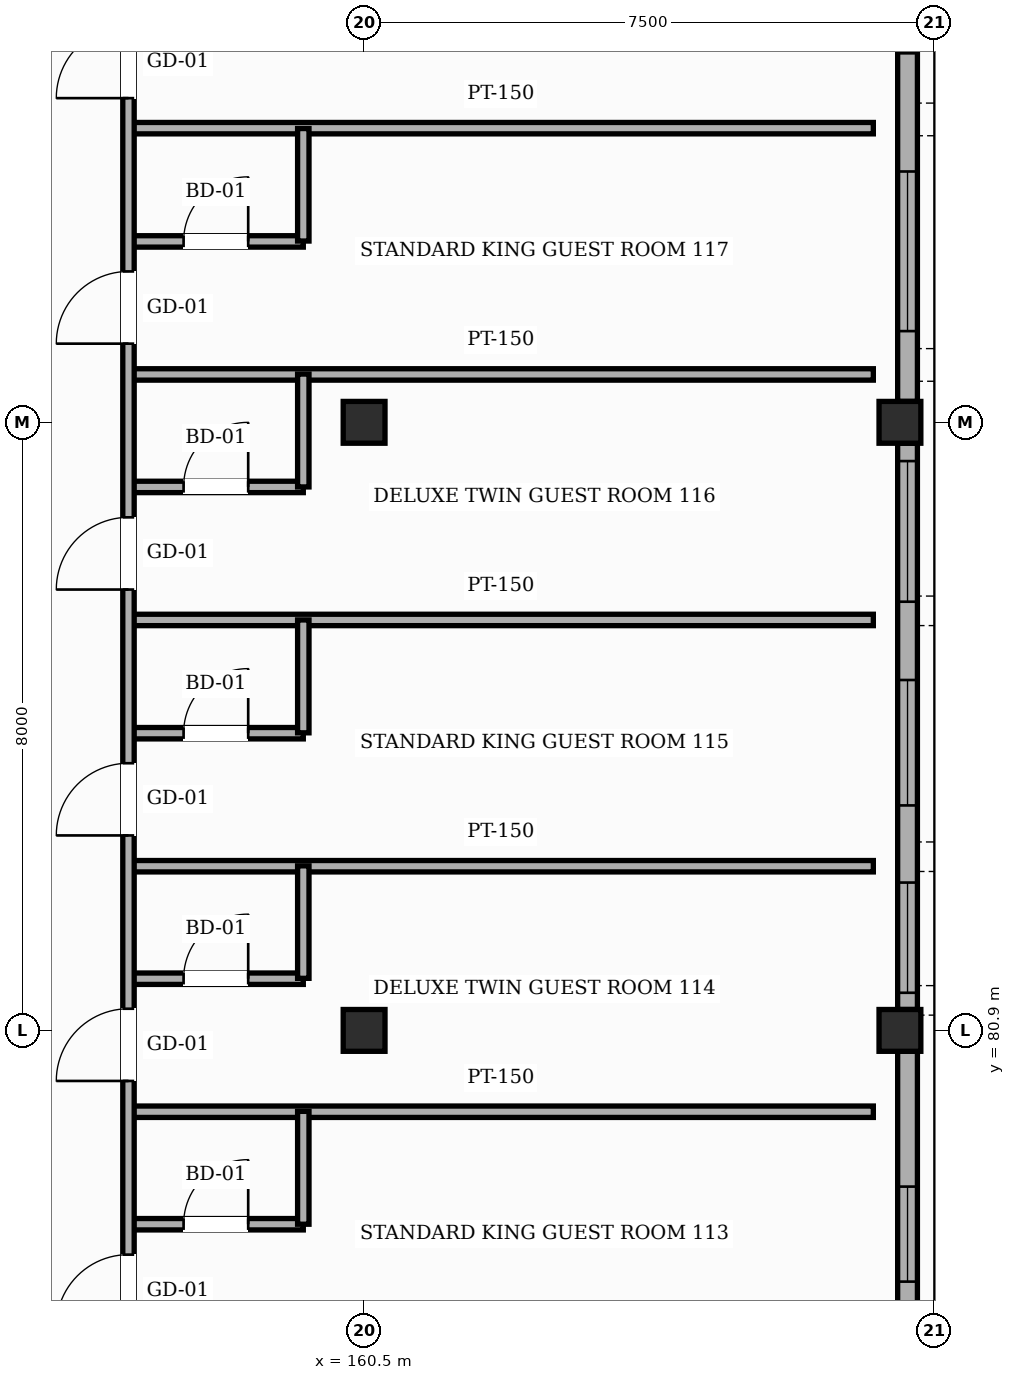
"""IFC4 building model, lengths in metres.
Left out: names, types, materials, properties, quantities, classifications, styles, units other than length and angle.
Written with IfcOpenShell. Run it as: python <this file> out.ifc"""

import sys

from ifc_helpers import new_model, si_unit, direction, frame, frame_2d, origin, origin_2d, place, context, subcontext, project, spatial, rectangle, hollow_rectangle, extrude, element, fill, save


model = new_model("IFC4")
c1 = context("Model", 3, precision=1e-05, world=origin(), true_north=direction((0.0, 1.0)))
c2 = subcontext(c1, "Body", "Model", "MODEL_VIEW")
j1 = project(units=[si_unit("LENGTHUNIT", "METRE"), si_unit("PLANEANGLEUNIT", "RADIAN")], contexts=[c1])
p1 = place(None, origin())
s1 = spatial("IfcSite", under=j1, at=p1, CompositionType="ELEMENT")
p2 = place(p1, origin())
s2 = spatial("IfcBuilding", under=s1, at=p2, CompositionType="ELEMENT")
p3 = place(p2, frame((0.0, 0.0, 24.6)))
s3 = spatial("IfcBuildingStorey", under=s2, at=p3, CompositionType="ELEMENT", Elevation=24.6)
for number, where, z_axis, x_axis in (
    (1, (160.5, 80.9, 0.0), (0.0, 0.0, 1.0), (1.0, 0.0, 0.0)),
    (2, (160.5, 88.9, 0.0), (0.0, 0.0, 1.0), (1.0, 0.0, 0.0)),
    (3, (167.55, 80.9, 0.0), (0.0, 0.0, 1.0), (1.0, 0.0, 0.0)),
    (4, (167.55, 88.9, 0.0), (0.0, 0.0, 1.0), (1.0, 0.0, 0.0)),
):
    element("IfcColumn", number, at=place(p3, frame(where, z_axis=z_axis, x_axis=x_axis)), inside=s3, PredefinedType="COLUMN", context=c2, shape_type="SweptSolid", body=[
        extrude(hollow_rectangle(XDim=0.55, YDim=0.55, WallThickness=0.022, InnerFilletRadius=0.022, OuterFilletRadius=0.044, at=origin_2d()), origin(), (0.0, 0.0, 1.0), 3.6),
    ])
p4 = place(p3, frame((167.65, 80.625, 0.0), z_axis=(0.0, 0.0, 1.0), x_axis=(0.0, -1.0, 0.0)))
e5 = element("IfcWall", 5, at=p4, inside=s3, PredefinedType="SOLIDWALL", context=c2, shape_type="SweptSolid", body=[
    extrude(rectangle(XDim=4.2, YDim=0.26, at=frame_2d((2.1, 0.0))), origin(), (0.0, 0.0, 1.0), 3.365),
])
p5 = place(p4, frame((1.78, 0.0, 0.85)))
e6 = element("IfcOpeningElement", 6, at=p5, cuts=e5, PredefinedType="OPENING", context=c2, shape_type="SweptSolid", body=[
    extrude(rectangle(XDim=1.25, YDim=1.65, at=frame_2d((0.625, 0.825))), frame((0.0, 0.14, 0.0), z_axis=(0.0, -1.0, 0.0), x_axis=(1.0, 0.0, 0.0)), (0.0, 0.0, 1.0), 0.28),
])
p6 = place(p3, frame((167.65, 88.625, 0.0), z_axis=(0.0, 0.0, 1.0), x_axis=(0.0, -1.0, 0.0)))
e7 = element("IfcWall", 7, at=p6, inside=s3, PredefinedType="SOLIDWALL", context=c2, shape_type="SweptSolid", body=[
    extrude(rectangle(XDim=7.45, YDim=0.26, at=frame_2d((3.725, 0.0))), origin(), (0.0, 0.0, 1.0), 2.755),
])
p7 = place(p6, frame((5.78, 0.0, 0.85)))
e8 = element("IfcOpeningElement", 8, at=p7, cuts=e7, PredefinedType="OPENING", context=c2, shape_type="SweptSolid", body=[
    extrude(rectangle(XDim=1.45, YDim=1.65, at=frame_2d((0.725, 0.825))), frame((0.0, 0.14, 0.0), z_axis=(0.0, -1.0, 0.0), x_axis=(1.0, 0.0, 0.0)), (0.0, 0.0, 1.0), 0.28),
])
p8 = place(p6, frame((3.115, 0.0, 0.85)))
e9 = element("IfcOpeningElement", 9, at=p8, cuts=e7, PredefinedType="OPENING", context=c2, shape_type="SweptSolid", body=[
    extrude(rectangle(XDim=1.65, YDim=1.65, at=frame_2d((0.825, 0.825))), frame((0.0, 0.14, 0.0), z_axis=(0.0, -1.0, 0.0), x_axis=(1.0, 0.0, 0.0)), (0.0, 0.0, 1.0), 0.28),
])
p9 = place(p6, frame((0.235, 0.0, 0.85)))
e10 = element("IfcOpeningElement", 10, at=p9, cuts=e7, PredefinedType="OPENING", context=c2, shape_type="SweptSolid", body=[
    extrude(rectangle(XDim=1.85, YDim=1.65, at=frame_2d((0.925, 0.825))), frame((0.0, 0.14, 0.0), z_axis=(0.0, -1.0, 0.0), x_axis=(1.0, 0.0, 0.0)), (0.0, 0.0, 1.0), 0.28),
])
p10 = place(p3, frame((167.65, 96.0, 0.0), z_axis=(0.0, 0.0, 1.0), x_axis=(0.0, -1.0, 0.0)))
e11 = element("IfcWall", 11, at=p10, inside=s3, PredefinedType="SOLIDWALL", context=c2, shape_type="SweptSolid", body=[
    extrude(rectangle(XDim=6.825, YDim=0.26, at=frame_2d((3.413, 0.0))), origin(), (0.0, 0.0, 1.0), 2.755),
])
p11 = place(p10, frame((3.8, 0.0, 0.85)))
e12 = element("IfcOpeningElement", 12, at=p11, cuts=e11, PredefinedType="OPENING", context=c2, shape_type="SweptSolid", body=[
    extrude(rectangle(XDim=2.1, YDim=1.65, at=frame_2d((1.05, 0.825))), frame((0.0, 0.14, 0.0), z_axis=(0.0, -1.0, 0.0), x_axis=(1.0, 0.0, 0.0)), (0.0, 0.0, 1.0), 0.28),
])
p12 = place(p10, frame((0.995, 0.0, 0.85)))
e13 = element("IfcOpeningElement", 13, at=p12, cuts=e11, PredefinedType="OPENING", context=c2, shape_type="SweptSolid", body=[
    extrude(rectangle(XDim=1.25, YDim=1.35, at=frame_2d((0.625, 0.675))), frame((0.0, 0.14, 0.0), z_axis=(0.0, -1.0, 0.0), x_axis=(1.0, 0.0, 0.0)), (0.0, 0.0, 1.0), 0.28),
])
p13 = place(p3, frame((157.4, 78.35, 0.0), z_axis=(0.0, 0.0, 1.0), x_axis=(1.0, 0.0, 0.0)))
e14 = element("IfcWall", 14, at=p13, inside=s3, PredefinedType="PARTITIONING", context=c2, shape_type="SweptSolid", body=[
    extrude(rectangle(XDim=2.3, YDim=0.15, at=frame_2d((1.15, 0.0))), origin(), (0.0, 0.0, 1.0), 3.365),
])
p14 = place(p13, frame((0.725, 0.0, 0.0)))
e15 = element("IfcOpeningElement", 15, at=p14, cuts=e14, PredefinedType="OPENING", context=c2, shape_type="SweptSolid", body=[
    extrude(rectangle(XDim=0.85, YDim=2.1, at=frame_2d((0.425, 1.05))), frame((0.0, 0.085, 0.0), z_axis=(0.0, -1.0, 0.0), x_axis=(1.0, 0.0, 0.0)), (0.0, 0.0, 1.0), 0.17),
])
p15 = place(p3, frame((157.4, 79.83, 0.0), z_axis=(0.0, 0.0, 1.0), x_axis=(1.0, 0.0, 0.0)))
e16 = element("IfcWall", 16, at=p15, inside=s3, PredefinedType="PARTITIONING", context=c2, shape_type="SweptSolid", body=[
    extrude(rectangle(XDim=9.8, YDim=0.15, at=frame_2d((4.9, 0.0))), origin(), (0.0, 0.0, 1.0), 3.365),
])
p16 = place(p3, frame((157.4, 81.58, 0.0), z_axis=(0.0, 0.0, 1.0), x_axis=(1.0, 0.0, 0.0)))
e17 = element("IfcWall", 17, at=p16, inside=s3, PredefinedType="PARTITIONING", context=c2, shape_type="SweptSolid", body=[
    extrude(rectangle(XDim=2.3, YDim=0.15, at=frame_2d((1.15, 0.0))), origin(), (0.0, 0.0, 1.0), 3.365),
])
p17 = place(p16, frame((0.725, 0.0, 0.0)))
e18 = element("IfcOpeningElement", 18, at=p17, cuts=e17, PredefinedType="OPENING", context=c2, shape_type="SweptSolid", body=[
    extrude(rectangle(XDim=0.85, YDim=2.1, at=frame_2d((0.425, 1.05))), frame((0.0, 0.085, 0.0), z_axis=(0.0, -1.0, 0.0), x_axis=(1.0, 0.0, 0.0)), (0.0, 0.0, 1.0), 0.17),
])
p18 = place(p3, frame((157.4, 83.06, 0.0), z_axis=(0.0, 0.0, 1.0), x_axis=(1.0, 0.0, 0.0)))
e19 = element("IfcWall", 19, at=p18, inside=s3, PredefinedType="PARTITIONING", context=c2, shape_type="SweptSolid", body=[
    extrude(rectangle(XDim=9.8, YDim=0.15, at=frame_2d((4.9, 0.0))), origin(), (0.0, 0.0, 1.0), 3.365),
])
p19 = place(p3, frame((157.4, 84.81, 0.0), z_axis=(0.0, 0.0, 1.0), x_axis=(1.0, 0.0, 0.0)))
e20 = element("IfcWall", 20, at=p19, inside=s3, PredefinedType="PARTITIONING", context=c2, shape_type="SweptSolid", body=[
    extrude(rectangle(XDim=2.3, YDim=0.15, at=frame_2d((1.15, 0.0))), origin(), (0.0, 0.0, 1.0), 3.005),
])
p20 = place(p19, frame((0.725, 0.0, 0.0)))
e21 = element("IfcOpeningElement", 21, at=p20, cuts=e20, PredefinedType="OPENING", context=c2, shape_type="SweptSolid", body=[
    extrude(rectangle(XDim=0.85, YDim=2.1, at=frame_2d((0.425, 1.05))), frame((0.0, 0.085, 0.0), z_axis=(0.0, -1.0, 0.0), x_axis=(1.0, 0.0, 0.0)), (0.0, 0.0, 1.0), 0.17),
])
p21 = place(p3, frame((157.4, 86.3, 0.0), z_axis=(0.0, 0.0, 1.0), x_axis=(1.0, 0.0, 0.0)))
e22 = element("IfcWall", 22, at=p21, inside=s3, PredefinedType="PARTITIONING", context=c2, shape_type="SweptSolid", body=[
    extrude(rectangle(XDim=9.8, YDim=0.15, at=frame_2d((4.9, 0.0))), origin(), (0.0, 0.0, 1.0), 3.365),
])
p22 = place(p3, frame((157.4, 88.05, 0.0), z_axis=(0.0, 0.0, 1.0), x_axis=(1.0, 0.0, 0.0)))
e23 = element("IfcWall", 23, at=p22, inside=s3, PredefinedType="PARTITIONING", context=c2, shape_type="SweptSolid", body=[
    extrude(rectangle(XDim=2.3, YDim=0.15, at=frame_2d((1.15, 0.0))), origin(), (0.0, 0.0, 1.0), 3.365),
])
p23 = place(p22, frame((0.725, 0.0, 0.0)))
e24 = element("IfcOpeningElement", 24, at=p23, cuts=e23, PredefinedType="OPENING", context=c2, shape_type="SweptSolid", body=[
    extrude(rectangle(XDim=0.85, YDim=2.1, at=frame_2d((0.425, 1.05))), frame((0.0, 0.085, 0.0), z_axis=(0.0, -1.0, 0.0), x_axis=(1.0, 0.0, 0.0)), (0.0, 0.0, 1.0), 0.17),
])
p24 = place(p3, frame((157.4, 89.53, 0.0), z_axis=(0.0, 0.0, 1.0), x_axis=(1.0, 0.0, 0.0)))
e25 = element("IfcWall", 25, at=p24, inside=s3, PredefinedType="PARTITIONING", context=c2, shape_type="SweptSolid", body=[
    extrude(rectangle(XDim=9.8, YDim=0.15, at=frame_2d((4.9, 0.0))), origin(), (0.0, 0.0, 1.0), 3.365),
])
p25 = place(p3, frame((157.4, 91.28, 0.0), z_axis=(0.0, 0.0, 1.0), x_axis=(1.0, 0.0, 0.0)))
e26 = element("IfcWall", 26, at=p25, inside=s3, PredefinedType="PARTITIONING", context=c2, shape_type="SweptSolid", body=[
    extrude(rectangle(XDim=2.3, YDim=0.15, at=frame_2d((1.15, 0.0))), origin(), (0.0, 0.0, 1.0), 3.365),
])
p26 = place(p25, frame((0.725, 0.0, 0.0)))
e27 = element("IfcOpeningElement", 27, at=p26, cuts=e26, PredefinedType="OPENING", context=c2, shape_type="SweptSolid", body=[
    extrude(rectangle(XDim=0.85, YDim=2.1, at=frame_2d((0.425, 1.05))), frame((0.0, 0.085, 0.0), z_axis=(0.0, -1.0, 0.0), x_axis=(1.0, 0.0, 0.0)), (0.0, 0.0, 1.0), 0.17),
])
p27 = place(p3, frame((157.4, 92.77, 0.0), z_axis=(0.0, 0.0, 1.0), x_axis=(1.0, 0.0, 0.0)))
e28 = element("IfcWall", 28, at=p27, inside=s3, PredefinedType="PARTITIONING", context=c2, shape_type="SweptSolid", body=[
    extrude(rectangle(XDim=9.8, YDim=0.15, at=frame_2d((4.9, 0.0))), origin(), (0.0, 0.0, 1.0), 3.005),
])
p28 = place(p3, frame((157.4, 76.6, 0.0), z_axis=(0.0, 0.0, 1.0), x_axis=(0.0, 1.0, 0.0)))
e29 = element("IfcWall", 29, at=p28, inside=s3, PredefinedType="PARTITIONING", context=c2, shape_type="SweptSolid", body=[
    extrude(rectangle(XDim=28.0, YDim=0.15, at=frame_2d((14.0, 0.0))), origin(), (0.0, 0.0, 1.0), 3.365),
])
p29 = place(p28, frame((22.95, 0.0, 0.0)))
e30 = element("IfcOpeningElement", 30, at=p29, cuts=e29, PredefinedType="OPENING", context=c2, shape_type="SweptSolid", body=[
    extrude(rectangle(XDim=1.5, YDim=2.3, at=frame_2d((0.75, 1.15))), frame((0.0, 0.085, 0.0), z_axis=(0.0, -1.0, 0.0), x_axis=(1.0, 0.0, 0.0)), (0.0, 0.0, 1.0), 0.17),
])
p30 = place(p28, frame((0.4, 0.0, 0.0)))
e31 = element("IfcOpeningElement", 31, at=p30, cuts=e29, PredefinedType="OPENING", context=c2, shape_type="SweptSolid", body=[
    extrude(rectangle(XDim=0.95, YDim=2.15, at=frame_2d((0.475, 1.075))), frame((0.0, 0.085, 0.0), z_axis=(0.0, -1.0, 0.0), x_axis=(1.0, 0.0, 0.0)), (0.0, 0.0, 1.0), 0.17),
])
p31 = place(p28, frame((3.635, 0.0, 0.0)))
e32 = element("IfcOpeningElement", 32, at=p31, cuts=e29, PredefinedType="OPENING", context=c2, shape_type="SweptSolid", body=[
    extrude(rectangle(XDim=0.95, YDim=2.15, at=frame_2d((0.475, 1.075))), frame((0.0, 0.085, 0.0), z_axis=(0.0, -1.0, 0.0), x_axis=(1.0, 0.0, 0.0)), (0.0, 0.0, 1.0), 0.17),
])
p32 = place(p28, frame((6.865, 0.0, 0.0)))
e33 = element("IfcOpeningElement", 33, at=p32, cuts=e29, PredefinedType="OPENING", context=c2, shape_type="SweptSolid", body=[
    extrude(rectangle(XDim=0.95, YDim=2.15, at=frame_2d((0.475, 1.075))), frame((0.0, 0.085, 0.0), z_axis=(0.0, -1.0, 0.0), x_axis=(1.0, 0.0, 0.0)), (0.0, 0.0, 1.0), 0.17),
])
p33 = place(p28, frame((10.1, 0.0, 0.0)))
e34 = element("IfcOpeningElement", 34, at=p33, cuts=e29, PredefinedType="OPENING", context=c2, shape_type="SweptSolid", body=[
    extrude(rectangle(XDim=0.95, YDim=2.15, at=frame_2d((0.475, 1.075))), frame((0.0, 0.085, 0.0), z_axis=(0.0, -1.0, 0.0), x_axis=(1.0, 0.0, 0.0)), (0.0, 0.0, 1.0), 0.17),
])
p34 = place(p28, frame((13.335, 0.0, 0.0)))
e35 = element("IfcOpeningElement", 35, at=p34, cuts=e29, PredefinedType="OPENING", context=c2, shape_type="SweptSolid", body=[
    extrude(rectangle(XDim=0.95, YDim=2.15, at=frame_2d((0.475, 1.075))), frame((0.0, 0.085, 0.0), z_axis=(0.0, -1.0, 0.0), x_axis=(1.0, 0.0, 0.0)), (0.0, 0.0, 1.0), 0.17),
])
p35 = place(p28, frame((16.565, 0.0, 0.0)))
e36 = element("IfcOpeningElement", 36, at=p35, cuts=e29, PredefinedType="OPENING", context=c2, shape_type="SweptSolid", body=[
    extrude(rectangle(XDim=0.95, YDim=2.15, at=frame_2d((0.475, 1.075))), frame((0.0, 0.085, 0.0), z_axis=(0.0, -1.0, 0.0), x_axis=(1.0, 0.0, 0.0)), (0.0, 0.0, 1.0), 0.17),
])
p36 = place(p3, frame((159.7, 78.35, 0.0), z_axis=(0.0, 0.0, 1.0), x_axis=(0.0, 1.0, 0.0)))
e37 = element("IfcWall", 37, at=p36, inside=s3, PredefinedType="PARTITIONING", context=c2, shape_type="SweptSolid", body=[
    extrude(rectangle(XDim=1.485, YDim=0.15, at=frame_2d((0.742, 0.0))), origin(), (0.0, 0.0, 1.0), 3.365),
])
p37 = place(p3, frame((159.7, 81.585, 0.0), z_axis=(0.0, 0.0, 1.0), x_axis=(0.0, 1.0, 0.0)))
e38 = element("IfcWall", 38, at=p37, inside=s3, PredefinedType="PARTITIONING", context=c2, shape_type="SweptSolid", body=[
    extrude(rectangle(XDim=1.48, YDim=0.15, at=frame_2d((0.74, 0.0))), origin(), (0.0, 0.0, 1.0), 3.365),
])
p38 = place(p3, frame((159.7, 84.815, 0.0), z_axis=(0.0, 0.0, 1.0), x_axis=(0.0, 1.0, 0.0)))
e39 = element("IfcWall", 39, at=p38, inside=s3, PredefinedType="PARTITIONING", context=c2, shape_type="SweptSolid", body=[
    extrude(rectangle(XDim=1.485, YDim=0.15, at=frame_2d((0.743, 0.0))), origin(), (0.0, 0.0, 1.0), 3.365),
])
p39 = place(p3, frame((159.7, 88.05, 0.0), z_axis=(0.0, 0.0, 1.0), x_axis=(0.0, 1.0, 0.0)))
e40 = element("IfcWall", 40, at=p39, inside=s3, PredefinedType="PARTITIONING", context=c2, shape_type="SweptSolid", body=[
    extrude(rectangle(XDim=1.485, YDim=0.15, at=frame_2d((0.742, 0.0))), origin(), (0.0, 0.0, 1.0), 3.365),
])
p40 = place(p3, frame((159.7, 91.285, 0.0), z_axis=(0.0, 0.0, 1.0), x_axis=(0.0, 1.0, 0.0)))
e41 = element("IfcWall", 41, at=p40, inside=s3, PredefinedType="PARTITIONING", context=c2, shape_type="SweptSolid", body=[
    extrude(rectangle(XDim=1.48, YDim=0.15, at=frame_2d((0.74, 0.0))), origin(), (0.0, 0.0, 1.0), 3.365),
])
p41 = place(p5, origin())
e42 = element("IfcWindow", 42, at=p41, inside=s3, PartitioningType="SINGLE_PANEL", PredefinedType="WINDOW", context=c2, shape_type="SweptSolid", body=[
    extrude(rectangle(XDim=1.25, YDim=1.65, at=frame_2d((0.625, 0.825))), frame((0.0, 0.03, 0.0), z_axis=(0.0, -1.0, 0.0), x_axis=(1.0, 0.0, 0.0)), (0.0, 0.0, 1.0), 0.06),
])
fill(e6, e42)
p42 = place(p7, origin())
e43 = element("IfcWindow", 43, at=p42, inside=s3, PartitioningType="SINGLE_PANEL", PredefinedType="WINDOW", context=c2, shape_type="SweptSolid", body=[
    extrude(rectangle(XDim=1.45, YDim=1.65, at=frame_2d((0.725, 0.825))), frame((0.0, 0.03, 0.0), z_axis=(0.0, -1.0, 0.0), x_axis=(1.0, 0.0, 0.0)), (0.0, 0.0, 1.0), 0.06),
])
fill(e8, e43)
p43 = place(p8, origin())
e44 = element("IfcWindow", 44, at=p43, inside=s3, PartitioningType="SINGLE_PANEL", PredefinedType="WINDOW", context=c2, shape_type="SweptSolid", body=[
    extrude(rectangle(XDim=1.65, YDim=1.65, at=frame_2d((0.825, 0.825))), frame((0.0, 0.03, 0.0), z_axis=(0.0, -1.0, 0.0), x_axis=(1.0, 0.0, 0.0)), (0.0, 0.0, 1.0), 0.06),
])
fill(e9, e44)
p44 = place(p9, origin())
e45 = element("IfcWindow", 45, at=p44, inside=s3, PartitioningType="SINGLE_PANEL", PredefinedType="WINDOW", context=c2, shape_type="SweptSolid", body=[
    extrude(rectangle(XDim=1.85, YDim=1.65, at=frame_2d((0.925, 0.825))), frame((0.0, 0.03, 0.0), z_axis=(0.0, -1.0, 0.0), x_axis=(1.0, 0.0, 0.0)), (0.0, 0.0, 1.0), 0.06),
])
fill(e10, e45)
p45 = place(p11, origin())
e46 = element("IfcWindow", 46, at=p45, inside=s3, PartitioningType="SINGLE_PANEL", PredefinedType="WINDOW", context=c2, shape_type="SweptSolid", body=[
    extrude(rectangle(XDim=2.1, YDim=1.65, at=frame_2d((1.05, 0.825))), frame((0.0, 0.03, 0.0), z_axis=(0.0, -1.0, 0.0), x_axis=(1.0, 0.0, 0.0)), (0.0, 0.0, 1.0), 0.06),
])
fill(e12, e46)
p46 = place(p12, origin())
e47 = element("IfcWindow", 47, at=p46, inside=s3, PartitioningType="SINGLE_PANEL", PredefinedType="WINDOW", context=c2, shape_type="SweptSolid", body=[
    extrude(rectangle(XDim=1.25, YDim=1.35, at=frame_2d((0.625, 0.675))), frame((0.0, 0.03, 0.0), z_axis=(0.0, -1.0, 0.0), x_axis=(1.0, 0.0, 0.0)), (0.0, 0.0, 1.0), 0.06),
])
fill(e13, e47)
p47 = place(p30, origin())
e48 = element("IfcDoor", 48, at=p47, inside=s3, OperationType="SINGLE_SWING_LEFT", PredefinedType="DOOR", context=c2, shape_type="SweptSolid", body=[
    extrude(rectangle(XDim=0.95, YDim=2.15, at=frame_2d((0.475, 1.075))), frame((0.0, 0.025, 0.0), z_axis=(0.0, -1.0, 0.0), x_axis=(1.0, 0.0, 0.0)), (0.0, 0.0, 1.0), 0.05),
])
fill(e31, e48)
p48 = place(p14, origin())
e49 = element("IfcDoor", 49, at=p48, inside=s3, OperationType="SINGLE_SWING_RIGHT", PredefinedType="DOOR", context=c2, shape_type="SweptSolid", body=[
    extrude(rectangle(XDim=0.85, YDim=2.1, at=frame_2d((0.425, 1.05))), frame((0.0, 0.025, 0.0), z_axis=(0.0, -1.0, 0.0), x_axis=(1.0, 0.0, 0.0)), (0.0, 0.0, 1.0), 0.05),
])
fill(e15, e49)
p49 = place(p31, origin())
e50 = element("IfcDoor", 50, at=p49, inside=s3, OperationType="SINGLE_SWING_LEFT", PredefinedType="DOOR", context=c2, shape_type="SweptSolid", body=[
    extrude(rectangle(XDim=0.95, YDim=2.15, at=frame_2d((0.475, 1.075))), frame((0.0, 0.025, 0.0), z_axis=(0.0, -1.0, 0.0), x_axis=(1.0, 0.0, 0.0)), (0.0, 0.0, 1.0), 0.05),
])
fill(e32, e50)
p50 = place(p17, origin())
e51 = element("IfcDoor", 51, at=p50, inside=s3, OperationType="SINGLE_SWING_RIGHT", PredefinedType="DOOR", context=c2, shape_type="SweptSolid", body=[
    extrude(rectangle(XDim=0.85, YDim=2.1, at=frame_2d((0.425, 1.05))), frame((0.0, 0.025, 0.0), z_axis=(0.0, -1.0, 0.0), x_axis=(1.0, 0.0, 0.0)), (0.0, 0.0, 1.0), 0.05),
])
fill(e18, e51)
p51 = place(p32, origin())
e52 = element("IfcDoor", 52, at=p51, inside=s3, OperationType="SINGLE_SWING_LEFT", PredefinedType="DOOR", context=c2, shape_type="SweptSolid", body=[
    extrude(rectangle(XDim=0.95, YDim=2.15, at=frame_2d((0.475, 1.075))), frame((0.0, 0.025, 0.0), z_axis=(0.0, -1.0, 0.0), x_axis=(1.0, 0.0, 0.0)), (0.0, 0.0, 1.0), 0.05),
])
fill(e33, e52)
p52 = place(p20, origin())
e53 = element("IfcDoor", 53, at=p52, inside=s3, OperationType="SINGLE_SWING_RIGHT", PredefinedType="DOOR", context=c2, shape_type="SweptSolid", body=[
    extrude(rectangle(XDim=0.85, YDim=2.1, at=frame_2d((0.425, 1.05))), frame((0.0, 0.025, 0.0), z_axis=(0.0, -1.0, 0.0), x_axis=(1.0, 0.0, 0.0)), (0.0, 0.0, 1.0), 0.05),
])
fill(e21, e53)
p53 = place(p33, origin())
e54 = element("IfcDoor", 54, at=p53, inside=s3, OperationType="SINGLE_SWING_LEFT", PredefinedType="DOOR", context=c2, shape_type="SweptSolid", body=[
    extrude(rectangle(XDim=0.95, YDim=2.15, at=frame_2d((0.475, 1.075))), frame((0.0, 0.025, 0.0), z_axis=(0.0, -1.0, 0.0), x_axis=(1.0, 0.0, 0.0)), (0.0, 0.0, 1.0), 0.05),
])
fill(e34, e54)
p54 = place(p23, origin())
e55 = element("IfcDoor", 55, at=p54, inside=s3, OperationType="SINGLE_SWING_RIGHT", PredefinedType="DOOR", context=c2, shape_type="SweptSolid", body=[
    extrude(rectangle(XDim=0.85, YDim=2.1, at=frame_2d((0.425, 1.05))), frame((0.0, 0.025, 0.0), z_axis=(0.0, -1.0, 0.0), x_axis=(1.0, 0.0, 0.0)), (0.0, 0.0, 1.0), 0.05),
])
fill(e24, e55)
p55 = place(p34, origin())
e56 = element("IfcDoor", 56, at=p55, inside=s3, OperationType="SINGLE_SWING_LEFT", PredefinedType="DOOR", context=c2, shape_type="SweptSolid", body=[
    extrude(rectangle(XDim=0.95, YDim=2.15, at=frame_2d((0.475, 1.075))), frame((0.0, 0.025, 0.0), z_axis=(0.0, -1.0, 0.0), x_axis=(1.0, 0.0, 0.0)), (0.0, 0.0, 1.0), 0.05),
])
fill(e35, e56)
p56 = place(p26, origin())
e57 = element("IfcDoor", 57, at=p56, inside=s3, OperationType="SINGLE_SWING_RIGHT", PredefinedType="DOOR", context=c2, shape_type="SweptSolid", body=[
    extrude(rectangle(XDim=0.85, YDim=2.1, at=frame_2d((0.425, 1.05))), frame((0.0, 0.025, 0.0), z_axis=(0.0, -1.0, 0.0), x_axis=(1.0, 0.0, 0.0)), (0.0, 0.0, 1.0), 0.05),
])
fill(e27, e57)
p57 = place(p35, origin())
e58 = element("IfcDoor", 58, at=p57, inside=s3, OperationType="SINGLE_SWING_LEFT", PredefinedType="DOOR", context=c2, shape_type="SweptSolid", body=[
    extrude(rectangle(XDim=0.95, YDim=2.15, at=frame_2d((0.475, 1.075))), frame((0.0, 0.025, 0.0), z_axis=(0.0, -1.0, 0.0), x_axis=(1.0, 0.0, 0.0)), (0.0, 0.0, 1.0), 0.05),
])
fill(e36, e58)
save(model, sys.argv[1])
